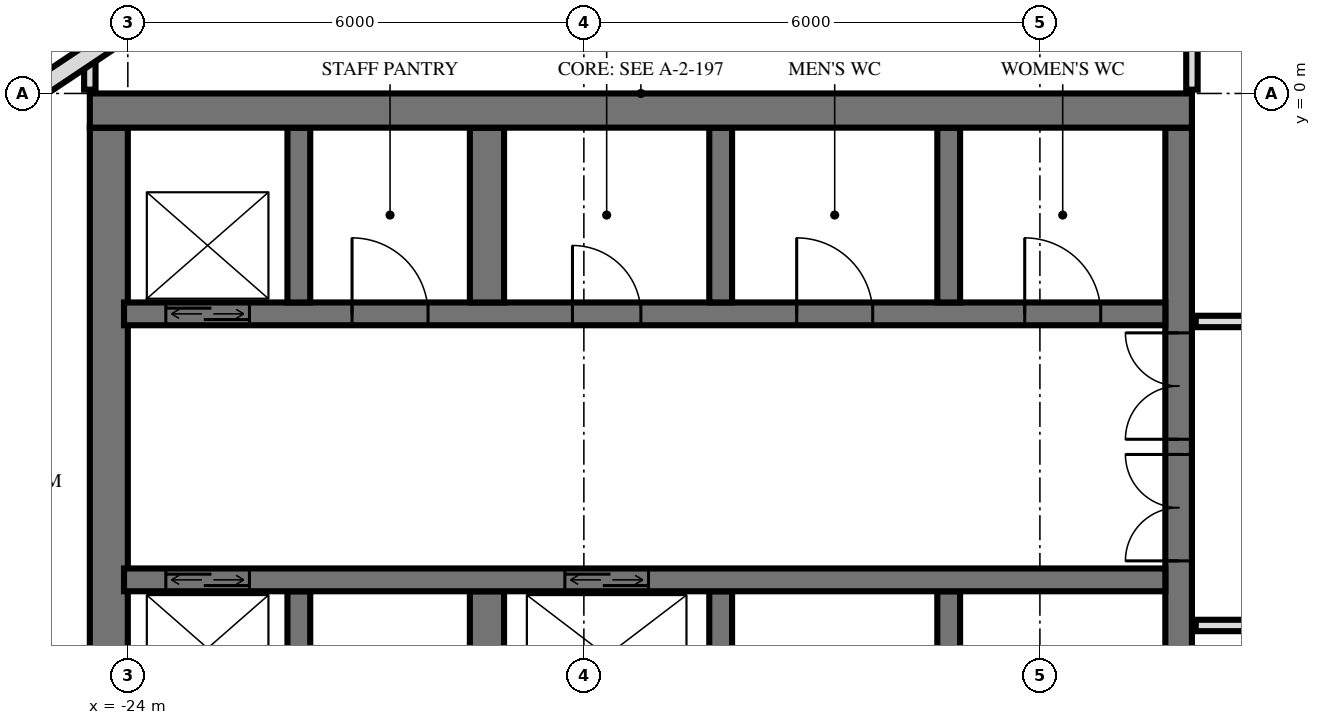
"""IFC4 building model, lengths in metres.
Left out: names, types, materials, properties, quantities, classifications, styles, units other than length and angle.
Written with IfcOpenShell. Run it as: python <this file> out.ifc"""

import sys

from ifc_helpers import new_model, si_unit, direction, frame, frame_2d, origin, place, context, subcontext, project, spatial, rectangle, extrude, element, fill, save


model = new_model("IFC4")
c1 = context("Model", 3, precision=1e-05, world=origin(), true_north=direction((0.0, 1.0)))
c2 = subcontext(c1, "Body", "Model", "MODEL_VIEW")
j1 = project(units=[si_unit("LENGTHUNIT", "METRE"), si_unit("PLANEANGLEUNIT", "RADIAN")], contexts=[c1])
p1 = place(None, origin())
s1 = spatial("IfcSite", under=j1, at=p1, CompositionType="ELEMENT")
p2 = place(p1, origin())
s2 = spatial("IfcBuilding", under=s1, at=p2, CompositionType="ELEMENT")
p3 = place(p2, frame((0.0, 0.0, 236.1)))
s3 = spatial("IfcBuildingStorey", under=s2, at=p3, CompositionType="ELEMENT", Elevation=236.1)
p4 = place(p3, frame((-24.5, -0.225, 0.0), z_axis=(0.0, 0.0, 1.0), x_axis=(1.0, 0.0, 0.0)))
e1 = element("IfcWall", 1, at=p4, inside=s3, PredefinedType="SHEAR", context=c2, shape_type="SweptSolid", body=[
    extrude(rectangle(XDim=14.5, YDim=0.45, at=frame_2d((7.25, 0.0))), origin(), (0.0, 0.0, 1.0), 3.5),
])
p5 = place(p3, frame((-10.175, -14.55, 0.0), z_axis=(0.0, 0.0, 1.0), x_axis=(0.0, 1.0, 0.0)))
e2 = element("IfcWall", 2, at=p5, inside=s3, PredefinedType="SHEAR", context=c2, shape_type="SweptSolid", body=[
    extrude(rectangle(XDim=14.1, YDim=0.35, at=frame_2d((7.05, 0.0))), origin(), (0.0, 0.0, 1.0), 3.5),
])
p6 = place(p5, frame((8.4, 0.0, 0.0)))
e3 = element("IfcOpeningElement", 3, at=p6, cuts=e2, PredefinedType="OPENING", context=c2, shape_type="SweptSolid", body=[
    extrude(rectangle(XDim=1.4, YDim=2.4, at=frame_2d((0.7, 1.2))), frame((0.0, 0.185, 0.0), z_axis=(0.0, -1.0, 0.0), x_axis=(1.0, 0.0, 0.0)), (0.0, 0.0, 1.0), 0.37),
])
p7 = place(p5, frame((10.0, 0.0, 0.0)))
e4 = element("IfcOpeningElement", 4, at=p7, cuts=e2, PredefinedType="OPENING", context=c2, shape_type="SweptSolid", body=[
    extrude(rectangle(XDim=1.4, YDim=2.4, at=frame_2d((0.7, 1.2))), frame((0.0, 0.185, 0.0), z_axis=(0.0, -1.0, 0.0), x_axis=(1.0, 0.0, 0.0)), (0.0, 0.0, 1.0), 0.37),
])
p8 = place(p5, frame((4.0, 0.0, 0.0)))
e5 = element("IfcOpeningElement", 5, at=p8, cuts=e2, PredefinedType="OPENING", context=c2, shape_type="SweptSolid", body=[
    extrude(rectangle(XDim=1.2, YDim=2.1, at=frame_2d((0.6, 1.05))), frame((0.0, 0.185, 0.0), z_axis=(0.0, -1.0, 0.0), x_axis=(1.0, 0.0, 0.0)), (0.0, 0.0, 1.0), 0.37),
])
p9 = place(p3, frame((-24.25, -14.55, 0.0), z_axis=(0.0, 0.0, 1.0), x_axis=(0.0, 1.0, 0.0)))
e6 = element("IfcWall", 6, at=p9, inside=s3, PredefinedType="SHEAR", context=c2, shape_type="SweptSolid", body=[
    extrude(rectangle(XDim=14.1, YDim=0.5, at=frame_2d((7.05, 0.0))), origin(), (0.0, 0.0, 1.0), 3.5),
])
p10 = place(p3, frame((-24.05, -2.9, 0.0), z_axis=(0.0, 0.0, 1.0), x_axis=(1.0, 0.0, 0.0)))
e7 = element("IfcWall", 7, at=p10, inside=s3, PredefinedType="SHEAR", context=c2, shape_type="SweptSolid", body=[
    extrude(rectangle(XDim=13.7, YDim=0.3, at=frame_2d((6.85, 0.0))), origin(), (0.0, 0.0, 1.0), 3.5),
])
p11 = place(p10, frame((0.55, 0.0, 0.0)))
e8 = element("IfcOpeningElement", 8, at=p11, cuts=e7, PredefinedType="OPENING", context=c2, shape_type="SweptSolid", body=[
    extrude(rectangle(XDim=1.1, YDim=2.1, at=frame_2d((0.55, 1.05))), frame((0.0, 0.16, 0.0), z_axis=(0.0, -1.0, 0.0), x_axis=(1.0, 0.0, 0.0)), (0.0, 0.0, 1.0), 0.32),
])
p12 = place(p10, frame((5.9, 0.0, 0.0)))
e9 = element("IfcOpeningElement", 9, at=p12, cuts=e7, PredefinedType="OPENING", context=c2, shape_type="SweptSolid", body=[
    extrude(rectangle(XDim=0.9, YDim=2.1, at=frame_2d((0.45, 1.05))), frame((0.0, 0.16, 0.0), z_axis=(0.0, -1.0, 0.0), x_axis=(1.0, 0.0, 0.0)), (0.0, 0.0, 1.0), 0.32),
])
p13 = place(p10, frame((11.85, 0.0, 0.0)))
e10 = element("IfcOpeningElement", 10, at=p13, cuts=e7, PredefinedType="OPENING", context=c2, shape_type="SweptSolid", body=[
    extrude(rectangle(XDim=1.0, YDim=2.1, at=frame_2d((0.5, 1.05))), frame((0.0, 0.16, 0.0), z_axis=(0.0, -1.0, 0.0), x_axis=(1.0, 0.0, 0.0)), (0.0, 0.0, 1.0), 0.32),
])
p14 = place(p10, frame((8.85, 0.0, 0.0)))
e11 = element("IfcOpeningElement", 11, at=p14, cuts=e7, PredefinedType="OPENING", context=c2, shape_type="SweptSolid", body=[
    extrude(rectangle(XDim=1.0, YDim=2.1, at=frame_2d((0.5, 1.05))), frame((0.0, 0.16, 0.0), z_axis=(0.0, -1.0, 0.0), x_axis=(1.0, 0.0, 0.0)), (0.0, 0.0, 1.0), 0.32),
])
p15 = place(p10, frame((3.0, 0.0, 0.0)))
e12 = element("IfcOpeningElement", 12, at=p15, cuts=e7, PredefinedType="OPENING", context=c2, shape_type="SweptSolid", body=[
    extrude(rectangle(XDim=1.0, YDim=2.1, at=frame_2d((0.5, 1.05))), frame((0.0, 0.16, 0.0), z_axis=(0.0, -1.0, 0.0), x_axis=(1.0, 0.0, 0.0)), (0.0, 0.0, 1.0), 0.32),
])
p16 = place(p3, frame((-24.05, -6.4, 0.0), z_axis=(0.0, 0.0, 1.0), x_axis=(1.0, 0.0, 0.0)))
e13 = element("IfcWall", 13, at=p16, inside=s3, PredefinedType="SHEAR", context=c2, shape_type="SweptSolid", body=[
    extrude(rectangle(XDim=13.7, YDim=0.3, at=frame_2d((6.85, 0.0))), origin(), (0.0, 0.0, 1.0), 3.5),
])
p17 = place(p16, frame((0.55, 0.0, 0.0)))
e14 = element("IfcOpeningElement", 14, at=p17, cuts=e13, PredefinedType="OPENING", context=c2, shape_type="SweptSolid", body=[
    extrude(rectangle(XDim=1.1, YDim=2.1, at=frame_2d((0.55, 1.05))), frame((0.0, 0.16, 0.0), z_axis=(0.0, -1.0, 0.0), x_axis=(1.0, 0.0, 0.0)), (0.0, 0.0, 1.0), 0.32),
])
p18 = place(p16, frame((5.8, 0.0, 0.0)))
e15 = element("IfcOpeningElement", 15, at=p18, cuts=e13, PredefinedType="OPENING", context=c2, shape_type="SweptSolid", body=[
    extrude(rectangle(XDim=1.1, YDim=2.1, at=frame_2d((0.55, 1.05))), frame((0.0, 0.16, 0.0), z_axis=(0.0, -1.0, 0.0), x_axis=(1.0, 0.0, 0.0)), (0.0, 0.0, 1.0), 0.32),
])
for number, where, z_axis, x_axis in (
    (16, (-13.2, -2.75, 0.0), (0.0, 0.0, 1.0), (0.0, 1.0, 0.0)),
    (17, (-13.2, -8.85, 0.0), (0.0, 0.0, 1.0), (0.0, 1.0, 0.0)),
    (18, (-16.2, -2.75, 0.0), (0.0, 0.0, 1.0), (0.0, 1.0, 0.0)),
    (19, (-16.2, -8.85, 0.0), (0.0, 0.0, 1.0), (0.0, 1.0, 0.0)),
):
    element("IfcWall", number, at=place(p3, frame(where, z_axis=z_axis, x_axis=x_axis)), inside=s3, PredefinedType="SHEAR", context=c2, shape_type="SweptSolid", body=[
        extrude(rectangle(XDim=2.3, YDim=0.3, at=frame_2d((1.15, 0.0))), origin(), (0.0, 0.0, 1.0), 3.5),
    ])
for number, where, z_axis, x_axis in (
    (20, (-19.275, -2.75, 0.0), (0.0, 0.0, 1.0), (0.0, 1.0, 0.0)),
    (21, (-19.275, -8.85, 0.0), (0.0, 0.0, 1.0), (0.0, 1.0, 0.0)),
):
    element("IfcWall", number, at=place(p3, frame(where, z_axis=z_axis, x_axis=x_axis)), inside=s3, PredefinedType="SHEAR", context=c2, shape_type="SweptSolid", body=[
        extrude(rectangle(XDim=2.3, YDim=0.45, at=frame_2d((1.15, 0.0))), origin(), (0.0, 0.0, 1.0), 3.5),
    ])
for number, where, z_axis, x_axis in (
    (22, (-21.75, -2.75, 0.0), (0.0, 0.0, 1.0), (0.0, 1.0, 0.0)),
    (23, (-21.75, -8.85, 0.0), (0.0, 0.0, 1.0), (0.0, 1.0, 0.0)),
):
    element("IfcWall", number, at=place(p3, frame(where, z_axis=z_axis, x_axis=x_axis)), inside=s3, PredefinedType="SHEAR", context=c2, shape_type="SweptSolid", body=[
        extrude(rectangle(XDim=2.3, YDim=0.3, at=frame_2d((1.15, 0.0))), origin(), (0.0, 0.0, 1.0), 3.5),
    ])
p19 = place(p3, frame((-24.194, 0.726, 0.0), z_axis=(0.0, 0.0, 1.0), x_axis=(-0.831482937015, -0.55555029066, 0.0)))
e24 = element("IfcWall", 24, at=p19, inside=s3, PredefinedType="SOLIDWALL", context=c2, shape_type="SweptSolid", body=[
    extrude(rectangle(XDim=1.656, YDim=0.25, at=frame_2d((0.828, 0.0))), origin(), (0.0, 0.0, 1.0), 3.22),
])
p20 = place(p3, frame((-10.0, 0.05, 0.0), z_axis=(0.0, 0.0, 1.0), x_axis=(0.0, 1.0, 0.0)))
e25 = element("IfcWall", 25, at=p20, inside=s3, PredefinedType="PARTITIONING", context=c2, shape_type="SweptSolid", body=[
    extrude(rectangle(XDim=0.97, YDim=0.15, at=frame_2d((0.485, 0.0))), origin(), (0.0, 0.0, 1.0), 3.22),
])
p21 = place(p3, frame((-24.5, 0.05, 0.0), z_axis=(0.0, 0.0, 1.0), x_axis=(0.0, 1.0, 0.0)))
e26 = element("IfcWall", 26, at=p21, inside=s3, PredefinedType="PARTITIONING", context=c2, shape_type="SweptSolid", body=[
    extrude(rectangle(XDim=0.405, YDim=0.15, at=frame_2d((0.203, 0.0))), origin(), (0.0, 0.0, 1.0), 3.22),
])
p22 = place(p3, frame((-9.95, -7.0, 0.0), z_axis=(0.0, 0.0, 1.0), x_axis=(1.0, 0.0, 0.0)))
e27 = element("IfcWall", 27, at=p22, inside=s3, PredefinedType="PARTITIONING", context=c2, shape_type="SweptSolid", body=[
    extrude(rectangle(XDim=19.9, YDim=0.15, at=frame_2d((9.95, 0.0))), origin(), (0.0, 0.0, 1.0), 3.22),
])
p23 = place(p22, frame((9.45, 0.0, 0.0)))
e28 = element("IfcOpeningElement", 28, at=p23, cuts=e27, PredefinedType="OPENING", context=c2, shape_type="SweptSolid", body=[
    extrude(rectangle(XDim=1.0, YDim=2.1, at=frame_2d((0.5, 1.05))), frame((0.0, 0.085, 0.0), z_axis=(0.0, -1.0, 0.0), x_axis=(1.0, 0.0, 0.0)), (0.0, 0.0, 1.0), 0.17),
])
p24 = place(p22, frame((15.45, 0.0, 0.0)))
e29 = element("IfcOpeningElement", 29, at=p24, cuts=e27, PredefinedType="OPENING", context=c2, shape_type="SweptSolid", body=[
    extrude(rectangle(XDim=1.0, YDim=2.1, at=frame_2d((0.5, 1.05))), frame((0.0, 0.085, 0.0), z_axis=(0.0, -1.0, 0.0), x_axis=(1.0, 0.0, 0.0)), (0.0, 0.0, 1.0), 0.17),
])
p25 = place(p3, frame((-9.95, -3.0, 0.0), z_axis=(0.0, 0.0, 1.0), x_axis=(1.0, 0.0, 0.0)))
e30 = element("IfcWall", 30, at=p25, inside=s3, PredefinedType="PARTITIONING", context=c2, shape_type="SweptSolid", body=[
    extrude(rectangle(XDim=19.9, YDim=0.15, at=frame_2d((9.95, 0.0))), origin(), (0.0, 0.0, 1.0), 3.22),
])
p26 = place(p25, frame((2.2, 0.0, 0.0)))
e31 = element("IfcOpeningElement", 31, at=p26, cuts=e30, PredefinedType="OPENING", context=c2, shape_type="SweptSolid", body=[
    extrude(rectangle(XDim=1.0, YDim=2.1, at=frame_2d((0.5, 1.05))), frame((0.0, 0.085, 0.0), z_axis=(0.0, -1.0, 0.0), x_axis=(1.0, 0.0, 0.0)), (0.0, 0.0, 1.0), 0.17),
])
p27 = place(p25, frame((7.2, 0.0, 0.0)))
e32 = element("IfcOpeningElement", 32, at=p27, cuts=e30, PredefinedType="OPENING", context=c2, shape_type="SweptSolid", body=[
    extrude(rectangle(XDim=1.0, YDim=2.1, at=frame_2d((0.5, 1.05))), frame((0.0, 0.085, 0.0), z_axis=(0.0, -1.0, 0.0), x_axis=(1.0, 0.0, 0.0)), (0.0, 0.0, 1.0), 0.17),
])
p28 = place(p25, frame((11.7, 0.0, 0.0)))
e33 = element("IfcOpeningElement", 33, at=p28, cuts=e30, PredefinedType="OPENING", context=c2, shape_type="SweptSolid", body=[
    extrude(rectangle(XDim=1.0, YDim=2.1, at=frame_2d((0.5, 1.05))), frame((0.0, 0.085, 0.0), z_axis=(0.0, -1.0, 0.0), x_axis=(1.0, 0.0, 0.0)), (0.0, 0.0, 1.0), 0.17),
])
p29 = place(p25, frame((15.45, 0.0, 0.0)))
e34 = element("IfcOpeningElement", 34, at=p29, cuts=e30, PredefinedType="OPENING", context=c2, shape_type="SweptSolid", body=[
    extrude(rectangle(XDim=1.0, YDim=2.1, at=frame_2d((0.5, 1.05))), frame((0.0, 0.085, 0.0), z_axis=(0.0, -1.0, 0.0), x_axis=(1.0, 0.0, 0.0)), (0.0, 0.0, 1.0), 0.17),
])
p30 = place(p25, frame((18.2, 0.0, 0.0)))
e35 = element("IfcOpeningElement", 35, at=p30, cuts=e30, PredefinedType="OPENING", context=c2, shape_type="SweptSolid", body=[
    extrude(rectangle(XDim=1.0, YDim=2.1, at=frame_2d((0.5, 1.05))), frame((0.0, 0.085, 0.0), z_axis=(0.0, -1.0, 0.0), x_axis=(1.0, 0.0, 0.0)), (0.0, 0.0, 1.0), 0.17),
])
p31 = place(p11, origin())
e36 = element("IfcDoor", 36, at=p31, inside=s3, OperationType="DOUBLE_DOOR_SLIDING", PredefinedType="USERDEFINED", context=c2, shape_type="SweptSolid", body=[
    extrude(rectangle(XDim=1.1, YDim=2.1, at=frame_2d((0.55, 1.05))), frame((0.0, 0.025, 0.0), z_axis=(0.0, -1.0, 0.0), x_axis=(1.0, 0.0, 0.0)), (0.0, 0.0, 1.0), 0.05),
])
fill(e8, e36)
p32 = place(p17, origin())
e37 = element("IfcDoor", 37, at=p32, inside=s3, OperationType="DOUBLE_DOOR_SLIDING", PredefinedType="USERDEFINED", context=c2, shape_type="SweptSolid", body=[
    extrude(rectangle(XDim=1.1, YDim=2.1, at=frame_2d((0.55, 1.05))), frame((0.0, 0.025, 0.0), z_axis=(0.0, -1.0, 0.0), x_axis=(1.0, 0.0, 0.0)), (0.0, 0.0, 1.0), 0.05),
])
fill(e14, e37)
p33 = place(p18, origin())
e38 = element("IfcDoor", 38, at=p33, inside=s3, OperationType="DOUBLE_DOOR_SLIDING", PredefinedType="USERDEFINED", context=c2, shape_type="SweptSolid", body=[
    extrude(rectangle(XDim=1.1, YDim=2.1, at=frame_2d((0.55, 1.05))), frame((0.0, 0.025, 0.0), z_axis=(0.0, -1.0, 0.0), x_axis=(1.0, 0.0, 0.0)), (0.0, 0.0, 1.0), 0.05),
])
fill(e15, e38)
p34 = place(p6, origin())
e39 = element("IfcDoor", 39, at=p34, inside=s3, OperationType="DOUBLE_DOOR_SINGLE_SWING", PredefinedType="DOOR", context=c2, shape_type="SweptSolid", body=[
    extrude(rectangle(XDim=1.4, YDim=2.4, at=frame_2d((0.7, 1.2))), frame((0.0, 0.025, 0.0), z_axis=(0.0, -1.0, 0.0), x_axis=(1.0, 0.0, 0.0)), (0.0, 0.0, 1.0), 0.05),
])
fill(e3, e39)
p35 = place(p7, origin())
e40 = element("IfcDoor", 40, at=p35, inside=s3, OperationType="DOUBLE_DOOR_SINGLE_SWING", PredefinedType="DOOR", context=c2, shape_type="SweptSolid", body=[
    extrude(rectangle(XDim=1.4, YDim=2.4, at=frame_2d((0.7, 1.2))), frame((0.0, 0.025, 0.0), z_axis=(0.0, -1.0, 0.0), x_axis=(1.0, 0.0, 0.0)), (0.0, 0.0, 1.0), 0.05),
])
fill(e4, e40)
p36 = place(p12, origin())
e41 = element("IfcDoor", 41, at=p36, inside=s3, OperationType="SINGLE_SWING_RIGHT", PredefinedType="DOOR", context=c2, shape_type="SweptSolid", body=[
    extrude(rectangle(XDim=0.9, YDim=2.1, at=frame_2d((0.45, 1.05))), frame((0.0, 0.025, 0.0), z_axis=(0.0, -1.0, 0.0), x_axis=(1.0, 0.0, 0.0)), (0.0, 0.0, 1.0), 0.05),
])
fill(e9, e41)
p37 = place(p13, origin())
e42 = element("IfcDoor", 42, at=p37, inside=s3, OperationType="SINGLE_SWING_RIGHT", PredefinedType="DOOR", context=c2, shape_type="SweptSolid", body=[
    extrude(rectangle(XDim=1.0, YDim=2.1, at=frame_2d((0.5, 1.05))), frame((0.0, 0.025, 0.0), z_axis=(0.0, -1.0, 0.0), x_axis=(1.0, 0.0, 0.0)), (0.0, 0.0, 1.0), 0.05),
])
fill(e10, e42)
p38 = place(p14, origin())
e43 = element("IfcDoor", 43, at=p38, inside=s3, OperationType="SINGLE_SWING_RIGHT", PredefinedType="DOOR", context=c2, shape_type="SweptSolid", body=[
    extrude(rectangle(XDim=1.0, YDim=2.1, at=frame_2d((0.5, 1.05))), frame((0.0, 0.025, 0.0), z_axis=(0.0, -1.0, 0.0), x_axis=(1.0, 0.0, 0.0)), (0.0, 0.0, 1.0), 0.05),
])
fill(e11, e43)
p39 = place(p15, origin())
e44 = element("IfcDoor", 44, at=p39, inside=s3, OperationType="SINGLE_SWING_RIGHT", PredefinedType="DOOR", context=c2, shape_type="SweptSolid", body=[
    extrude(rectangle(XDim=1.0, YDim=2.1, at=frame_2d((0.5, 1.05))), frame((0.0, 0.025, 0.0), z_axis=(0.0, -1.0, 0.0), x_axis=(1.0, 0.0, 0.0)), (0.0, 0.0, 1.0), 0.05),
])
fill(e12, e44)
save(model, sys.argv[1])
